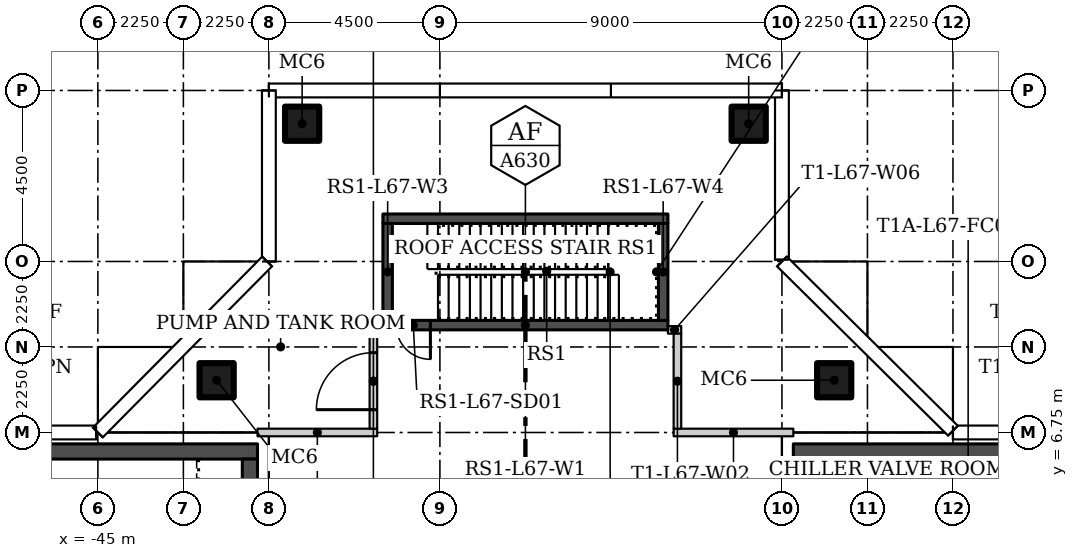
"""IFC4 building model, lengths in metres.
Left out: names, types, materials, properties, quantities, classifications, styles, units other than length and angle.
Written with IfcOpenShell. Run it as: python <this file> out.ifc"""

import sys

from ifc_helpers import new_model, si_unit, direction, frame, frame_2d, origin, origin_2d, place, context, subcontext, project, spatial, rectangle, hollow_rectangle, extrude, element, fill, save


model = new_model("IFC4")
c1 = context("Model", 3, precision=1e-05, world=origin(), true_north=direction((0.0, 1.0)))
c2 = subcontext(c1, "Body", "Model", "MODEL_VIEW")
j1 = project(units=[si_unit("LENGTHUNIT", "METRE"), si_unit("PLANEANGLEUNIT", "RADIAN")], contexts=[c1])
p1 = place(None, origin())
s1 = spatial("IfcSite", under=j1, at=p1, CompositionType="ELEMENT")
p2 = place(p1, origin())
s2 = spatial("IfcBuilding", under=s1, at=p2, CompositionType="ELEMENT")
p3 = place(p2, frame((0.0, 0.0, 278.3)))
s3 = spatial("IfcBuildingStorey", under=s2, at=p3, CompositionType="ELEMENT", Elevation=278.3)
for number, where in (
    (1, (-25.625, 8.125, 0.0)),
    (2, (-41.875, 8.125, 0.0)),
    (3, (-39.625, 14.875, 0.0)),
    (4, (-27.875, 14.875, 0.0)),
):
    element("IfcColumn", number, at=place(p3, frame(where)), inside=s3, PredefinedType="COLUMN", context=c2, shape_type="SweptSolid", body=[
        extrude(hollow_rectangle(XDim=0.9, YDim=0.9, WallThickness=0.036, at=origin_2d()), origin(), (0.0, 0.0, 1.0), 5.55),
    ])
for number, where in (
    (5, (-40.8, 6.75, 0.0)),
    (6, (-29.85, 6.75, 0.0)),
):
    element("IfcWall", number, at=place(p3, frame(where)), inside=s3, PredefinedType="PARTITIONING", context=c2, shape_type="SweptSolid", body=[
        extrude(rectangle(XDim=3.15, YDim=0.2, at=frame_2d((1.575, 0.0))), origin(), (0.0, 0.0, 1.0), 5.55),
    ])
p4 = place(p3, frame((-37.75, 6.85, 0.0), z_axis=(0.0, 0.0, 1.0), x_axis=(0.0, 1.0, 0.0)))
e7 = element("IfcWall", 7, at=p4, inside=s3, PredefinedType="PARTITIONING", context=c2, shape_type="SweptSolid", body=[
    extrude(rectangle(XDim=2.5, YDim=0.2, at=frame_2d((1.25, 0.0))), origin(), (0.0, 0.0, 1.0), 5.55),
])
p5 = place(p4, frame((0.5, 0.0, 0.0)))
e8 = element("IfcOpeningElement", 8, at=p5, cuts=e7, PredefinedType="OPENING", context=c2, shape_type="SweptSolid", body=[
    extrude(rectangle(XDim=1.5, YDim=2.4, at=frame_2d((0.75, 1.2))), frame((0.0, 0.11, 0.0), z_axis=(0.0, -1.0, 0.0), x_axis=(1.0, 0.0, 0.0)), (0.0, 0.0, 1.0), 0.22),
])
for number, where in (
    (9, (-37.85, 9.45, 0.0)),
    (10, (-30.0, 9.45, 0.0)),
):
    element("IfcWall", number, at=place(p3, frame(where)), inside=s3, PredefinedType="PARTITIONING", context=c2, shape_type="SweptSolid", body=[
        extrude(rectangle(XDim=0.35, YDim=0.2, at=frame_2d((0.175, 0.0))), origin(), (0.0, 0.0, 1.0), 5.55),
    ])
p6 = place(p3, frame((-29.75, 9.35, 0.0), z_axis=(0.0, 0.0, 1.0), x_axis=(0.0, -1.0, 0.0)))
e11 = element("IfcWall", 11, at=p6, inside=s3, PredefinedType="PARTITIONING", context=c2, shape_type="SweptSolid", body=[
    extrude(rectangle(XDim=2.5, YDim=0.2, at=frame_2d((1.25, 0.0))), origin(), (0.0, 0.0, 1.0), 5.55),
])
p7 = place(p3, frame((-26.7, 6.25, 0.0)))
e12 = element("IfcWall", 12, at=p7, inside=s3, PredefinedType="SHEAR", context=c2, shape_type="SweptSolid", body=[
    extrude(rectangle(XDim=12.9, YDim=0.4, at=frame_2d((6.45, 0.0))), origin(), (0.0, 0.0, 1.0), 5.55),
])
p8 = place(p3, frame((-26.5, 6.05, 0.0), z_axis=(0.0, 0.0, 1.0), x_axis=(0.0, -1.0, 0.0)))
e13 = element("IfcWall", 13, at=p8, inside=s3, PredefinedType="SHEAR", context=c2, shape_type="SweptSolid", body=[
    extrude(rectangle(XDim=12.1, YDim=0.4, at=frame_2d((6.05, 0.0))), origin(), (0.0, 0.0, 1.0), 5.55),
])
p9 = place(p8, frame((3.9, 0.0, 0.0)))
e14 = element("IfcOpeningElement", 14, at=p9, cuts=e13, PredefinedType="OPENING", context=c2, shape_type="SweptSolid", body=[
    extrude(rectangle(XDim=1.8, YDim=2.4, at=frame_2d((0.9, 1.2))), frame((0.0, 0.21, 0.0), z_axis=(0.0, -1.0, 0.0), x_axis=(1.0, 0.0, 0.0)), (0.0, 0.0, 1.0), 0.42),
])
p10 = place(p3, frame((-22.1, 3.25, 0.0), z_axis=(0.0, 0.0, 1.0), x_axis=(0.0, 1.0, 0.0)))
e15 = element("IfcWall", 15, at=p10, inside=s3, PredefinedType="PARTITIONING", context=c2, shape_type="SweptSolid", body=[
    extrude(rectangle(XDim=2.8, YDim=0.15, at=frame_2d((1.4, 0.0))), origin(), (0.0, 0.0, 1.0), 5.55),
])
p11 = place(p3, frame((-40.8, 6.25, 0.0), z_axis=(0.0, 0.0, 1.0), x_axis=(-1.0, 0.0, 0.0)))
e16 = element("IfcWall", 16, at=p11, inside=s3, PredefinedType="SHEAR", context=c2, shape_type="SweptSolid", body=[
    extrude(rectangle(XDim=12.9, YDim=0.4, at=frame_2d((6.45, 0.0))), origin(), (0.0, 0.0, 1.0), 5.55),
])
p12 = place(p3, frame((-41.0, -6.05, 0.0), z_axis=(0.0, 0.0, 1.0), x_axis=(0.0, 1.0, 0.0)))
e17 = element("IfcWall", 17, at=p12, inside=s3, PredefinedType="SHEAR", context=c2, shape_type="SweptSolid", body=[
    extrude(rectangle(XDim=12.1, YDim=0.4, at=frame_2d((6.05, 0.0))), origin(), (0.0, 0.0, 1.0), 5.55),
])
p13 = place(p12, frame((6.4, 0.0, 0.0)))
e18 = element("IfcOpeningElement", 18, at=p13, cuts=e17, PredefinedType="OPENING", context=c2, shape_type="SweptSolid", body=[
    extrude(rectangle(XDim=1.8, YDim=2.4, at=frame_2d((0.9, 1.2))), frame((0.0, 0.21, 0.0), z_axis=(0.0, -1.0, 0.0), x_axis=(1.0, 0.0, 0.0)), (0.0, 0.0, 1.0), 0.42),
])
p14 = place(p3, frame((-30.0, 9.575, 0.0), z_axis=(0.0, 0.0, 1.0), x_axis=(-1.0, 0.0, 0.0)))
e19 = element("IfcWall", 19, at=p14, inside=s3, PredefinedType="SHEAR", context=c2, shape_type="SweptSolid", body=[
    extrude(rectangle(XDim=7.5, YDim=0.25, at=frame_2d((3.75, 0.0))), origin(), (0.0, 0.0, 1.0), 5.55),
])
p15 = place(p14, frame((6.25, 0.0, 0.0)))
e20 = element("IfcOpeningElement", 20, at=p15, cuts=e19, PredefinedType="OPENING", context=c2, shape_type="SweptSolid", body=[
    extrude(rectangle(XDim=0.9, YDim=2.1, at=frame_2d((0.45, 1.05))), frame((0.0, 0.135, 0.0), z_axis=(0.0, -1.0, 0.0), x_axis=(1.0, 0.0, 0.0)), (0.0, 0.0, 1.0), 0.27),
])
p16 = place(p3, frame((-37.5, 12.375, 0.0)))
e21 = element("IfcWall", 21, at=p16, inside=s3, PredefinedType="SHEAR", context=c2, shape_type="SweptSolid", body=[
    extrude(rectangle(XDim=7.5, YDim=0.25, at=frame_2d((3.75, 0.0))), origin(), (0.0, 0.0, 1.0), 5.55),
])
for number, where, z_axis, x_axis in (
    (22, (-37.375, 9.7, 0.0), (0.0, 0.0, 1.0), (0.0, 1.0, 0.0)),
    (23, (-30.125, 9.7, 0.0), (0.0, 0.0, 1.0), (0.0, 1.0, 0.0)),
):
    element("IfcWall", number, at=place(p3, frame(where, z_axis=z_axis, x_axis=x_axis)), inside=s3, PredefinedType="SHEAR", context=c2, shape_type="SweptSolid", body=[
        extrude(rectangle(XDim=2.55, YDim=0.25, at=frame_2d((1.275, 0.0))), origin(), (0.0, 0.0, 1.0), 5.55),
    ])
p17 = place(p5, origin())
e24 = element("IfcDoor", 24, at=p17, inside=s3, OperationType="DOUBLE_DOOR_SINGLE_SWING", PredefinedType="DOOR", context=c2, shape_type="SweptSolid", body=[
    extrude(rectangle(XDim=1.5, YDim=2.4, at=frame_2d((0.75, 1.2))), frame((0.0, 0.025, 0.0), z_axis=(0.0, -1.0, 0.0), x_axis=(1.0, 0.0, 0.0)), (0.0, 0.0, 1.0), 0.05),
])
fill(e8, e24)
p18 = place(p15, origin())
e25 = element("IfcDoor", 25, at=p18, inside=s3, OperationType="SINGLE_SWING_RIGHT", PredefinedType="DOOR", context=c2, shape_type="SweptSolid", body=[
    extrude(rectangle(XDim=0.9, YDim=2.1, at=frame_2d((0.45, 1.05))), frame((0.0, 0.025, 0.0), z_axis=(0.0, -1.0, 0.0), x_axis=(1.0, 0.0, 0.0)), (0.0, 0.0, 1.0), 0.05),
])
fill(e20, e25)
save(model, sys.argv[1])
